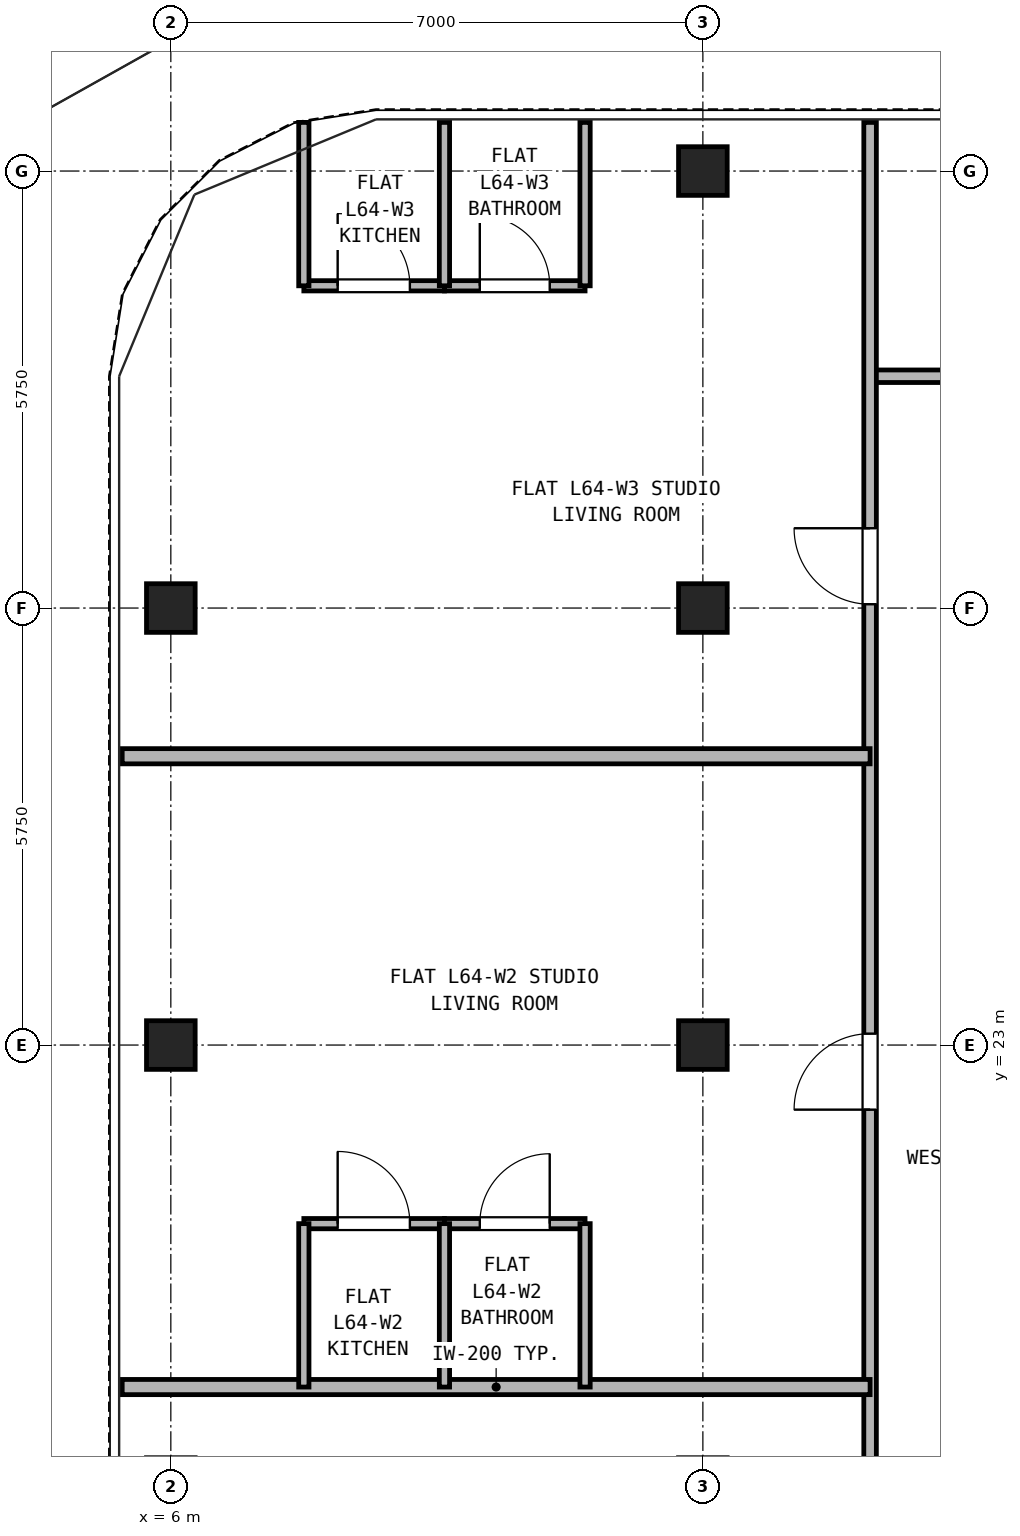
"""IFC4 building model, lengths in metres.
Left out: names, types, materials, properties, quantities, classifications, styles, units other than length and angle.
Written with IfcOpenShell. Run it as: python <this file> out.ifc"""

import sys

from ifc_helpers import new_model, si_unit, direction, frame, frame_2d, origin, origin_2d, place, context, subcontext, project, spatial, rectangle, hollow_rectangle, extrude, source, transform, mapped, element, fill, save


model = new_model("IFC4")
c1 = context("Model", 3, precision=1e-05, world=origin(), true_north=direction((0.0, 1.0)))
c2 = subcontext(c1, "Body", "Model", "MODEL_VIEW")
j1 = project(units=[si_unit("LENGTHUNIT", "METRE"), si_unit("PLANEANGLEUNIT", "RADIAN")], contexts=[c1])
p1 = place(None, origin())
s1 = spatial("IfcSite", under=j1, at=p1, CompositionType="ELEMENT")
p2 = place(p1, origin())
s2 = spatial("IfcBuilding", under=s1, at=p2, CompositionType="ELEMENT")
p3 = place(p2, frame((0.0, 0.0, 226.5)))
s3 = spatial("IfcBuildingStorey", under=s2, at=p3, CompositionType="ELEMENT", Elevation=226.5)
m1 = source(origin(), c2, "Body", "SweptSolid", [
    extrude(hollow_rectangle(XDim=0.64, YDim=0.64, WallThickness=0.035, at=origin_2d()), origin(), (0.0, 0.0, 1.0), 2.98),
])
for number, where, z_axis, x_axis in (
    (1, (13.0, 34.5, 0.0), (0.0, 0.0, 1.0), (1.0, 0.0, 0.0)),
    (2, (6.0, 23.0, 0.0), (0.0, 0.0, 1.0), (1.0, 0.0, 0.0)),
    (3, (6.0, 28.75, 0.0), (0.0, 0.0, 1.0), (1.0, 0.0, 0.0)),
    (4, (13.0, 23.0, 0.0), (0.0, 0.0, 1.0), (1.0, 0.0, 0.0)),
    (5, (13.0, 28.75, 0.0), (0.0, 0.0, 1.0), (1.0, 0.0, 0.0)),
):
    element("IfcColumn", number, at=place(p3, frame(where, z_axis=z_axis, x_axis=x_axis)), inside=s3, PredefinedType="COLUMN", context=c2, shape_type="MappedRepresentation", body=[
        mapped(m1, transform((0.0, 0.0, 0.0), x_axis=(1.0, 0.0, 0.0), y_axis=(0.0, 1.0, 0.0), z_axis=(0.0, 0.0, 1.0), scale=1.0)),
    ])
p4 = place(p3, frame((15.2, 31.8, 0.0), z_axis=(0.0, 0.0, 1.0), x_axis=(1.0, 0.0, 0.0)))
e6 = element("IfcWall", 6, at=p4, inside=s3, PredefinedType="PARTITIONING", context=c2, shape_type="SweptSolid", body=[
    extrude(rectangle(XDim=16.6, YDim=0.165, at=frame_2d((8.3, 0.0))), origin(), (0.0, 0.0, 1.0), 2.655),
])
p5 = place(p4, frame((3.65, 0.0, 0.0)))
e7 = element("IfcOpeningElement", 7, at=p5, cuts=e6, PredefinedType="OPENING", context=c2, shape_type="SweptSolid", body=[
    extrude(rectangle(XDim=0.95, YDim=2.15, at=frame_2d((0.475, 1.075))), frame((0.0, 0.093, 0.0), z_axis=(0.0, -1.0, 0.0), x_axis=(1.0, 0.0, 0.0)), (0.0, 0.0, 1.0), 0.185),
])
p6 = place(p4, frame((9.1, 0.0, 0.0)))
e8 = element("IfcOpeningElement", 8, at=p6, cuts=e6, PredefinedType="OPENING", context=c2, shape_type="SweptSolid", body=[
    extrude(rectangle(XDim=0.95, YDim=2.15, at=frame_2d((0.475, 1.075))), frame((0.0, 0.093, 0.0), z_axis=(0.0, -1.0, 0.0), x_axis=(1.0, 0.0, 0.0)), (0.0, 0.0, 1.0), 0.185),
])
p7 = place(p4, frame((13.25, 0.0, 0.0)))
e9 = element("IfcOpeningElement", 9, at=p7, cuts=e6, PredefinedType="OPENING", context=c2, shape_type="SweptSolid", body=[
    extrude(rectangle(XDim=0.92, YDim=2.1, at=frame_2d((0.46, 1.05))), frame((0.0, 0.093, 0.0), z_axis=(0.0, -1.0, 0.0), x_axis=(1.0, 0.0, 0.0)), (0.0, 0.0, 1.0), 0.185),
])
p8 = place(p3, frame((15.2, 10.65, 0.0), z_axis=(0.0, 0.0, 1.0), x_axis=(0.0, 1.0, 0.0)))
e10 = element("IfcWall", 10, at=p8, inside=s3, PredefinedType="PARTITIONING", context=c2, shape_type="SweptSolid", body=[
    extrude(rectangle(XDim=24.49, YDim=0.165, at=frame_2d((12.245, 0.0))), origin(), (0.0, 0.0, 1.0), 2.98),
])
p9 = place(p8, frame((3.425, 0.0, 0.0)))
e11 = element("IfcOpeningElement", 11, at=p9, cuts=e10, PredefinedType="OPENING", context=c2, shape_type="SweptSolid", body=[
    extrude(rectangle(XDim=1.0, YDim=2.15, at=frame_2d((0.5, 1.075))), frame((0.0, 0.093, 0.0), z_axis=(0.0, -1.0, 0.0), x_axis=(1.0, 0.0, 0.0)), (0.0, 0.0, 1.0), 0.185),
])
p10 = place(p8, frame((11.5, 0.0, 0.0)))
e12 = element("IfcOpeningElement", 12, at=p10, cuts=e10, PredefinedType="OPENING", context=c2, shape_type="SweptSolid", body=[
    extrude(rectangle(XDim=1.0, YDim=2.15, at=frame_2d((0.5, 1.075))), frame((0.0, 0.093, 0.0), z_axis=(0.0, -1.0, 0.0), x_axis=(1.0, 0.0, 0.0)), (0.0, 0.0, 1.0), 0.185),
])
p11 = place(p8, frame((18.15, 0.0, 0.0)))
e13 = element("IfcOpeningElement", 13, at=p11, cuts=e10, PredefinedType="OPENING", context=c2, shape_type="SweptSolid", body=[
    extrude(rectangle(XDim=1.0, YDim=2.15, at=frame_2d((0.5, 1.075))), frame((0.0, 0.093, 0.0), z_axis=(0.0, -1.0, 0.0), x_axis=(1.0, 0.0, 0.0)), (0.0, 0.0, 1.0), 0.185),
])
p12 = place(p3, frame((5.36, 18.5, 0.0), z_axis=(0.0, 0.0, 1.0), x_axis=(1.0, 0.0, 0.0)))
e14 = element("IfcWall", 14, at=p12, inside=s3, PredefinedType="PARTITIONING", context=c2, shape_type="SweptSolid", body=[
    extrude(rectangle(XDim=9.84, YDim=0.2, at=frame_2d((4.92, 0.0))), origin(), (0.0, 0.0, 1.0), 2.98),
])
p13 = place(p3, frame((7.75, 20.65, 0.0), z_axis=(0.0, 0.0, 1.0), x_axis=(1.0, 0.0, 0.0)))
e15 = element("IfcWall", 15, at=p13, inside=s3, PredefinedType="PARTITIONING", context=c2, shape_type="SweptSolid", body=[
    extrude(rectangle(XDim=1.85, YDim=0.135, at=frame_2d((0.925, 0.0))), origin(), (0.0, 0.0, 1.0), 2.98),
])
p14 = place(p13, frame((0.445, 0.0, 0.0)))
e16 = element("IfcOpeningElement", 16, at=p14, cuts=e15, PredefinedType="OPENING", context=c2, shape_type="SweptSolid", body=[
    extrude(rectangle(XDim=0.95, YDim=2.15, at=frame_2d((0.475, 1.075))), frame((0.0, 0.077, 0.0), z_axis=(0.0, -1.0, 0.0), x_axis=(1.0, 0.0, 0.0)), (0.0, 0.0, 1.0), 0.155),
])
p15 = place(p3, frame((9.6, 20.65, 0.0), z_axis=(0.0, 0.0, 1.0), x_axis=(1.0, 0.0, 0.0)))
e17 = element("IfcWall", 17, at=p15, inside=s3, PredefinedType="PARTITIONING", context=c2, shape_type="SweptSolid", body=[
    extrude(rectangle(XDim=1.85, YDim=0.135, at=frame_2d((0.925, 0.0))), origin(), (0.0, 0.0, 1.0), 2.98),
])
p16 = place(p15, frame((0.465, 0.0, 0.0)))
e18 = element("IfcOpeningElement", 18, at=p16, cuts=e17, PredefinedType="OPENING", context=c2, shape_type="SweptSolid", body=[
    extrude(rectangle(XDim=0.92, YDim=2.1, at=frame_2d((0.46, 1.05))), frame((0.0, 0.077, 0.0), z_axis=(0.0, -1.0, 0.0), x_axis=(1.0, 0.0, 0.0)), (0.0, 0.0, 1.0), 0.155),
])
for number, where, z_axis, x_axis in (
    (19, (7.75, 18.5, 0.0), (0.0, 0.0, 1.0), (0.0, 1.0, 0.0)),
    (20, (9.6, 18.5, 0.0), (0.0, 0.0, 1.0), (0.0, 1.0, 0.0)),
    (21, (11.45, 18.5, 0.0), (0.0, 0.0, 1.0), (0.0, 1.0, 0.0)),
):
    element("IfcWall", number, at=place(p3, frame(where, z_axis=z_axis, x_axis=x_axis)), inside=s3, PredefinedType="PARTITIONING", context=c2, shape_type="SweptSolid", body=[
        extrude(rectangle(XDim=2.15, YDim=0.135, at=frame_2d((1.075, 0.0))), origin(), (0.0, 0.0, 1.0), 2.98),
    ])
p17 = place(p3, frame((5.36, 26.8, 0.0), z_axis=(0.0, 0.0, 1.0), x_axis=(1.0, 0.0, 0.0)))
e22 = element("IfcWall", 22, at=p17, inside=s3, PredefinedType="PARTITIONING", context=c2, shape_type="SweptSolid", body=[
    extrude(rectangle(XDim=9.84, YDim=0.2, at=frame_2d((4.92, 0.0))), origin(), (0.0, 0.0, 1.0), 2.98),
])
p18 = place(p3, frame((7.75, 32.99, 0.0), z_axis=(0.0, 0.0, 1.0), x_axis=(1.0, 0.0, 0.0)))
e23 = element("IfcWall", 23, at=p18, inside=s3, PredefinedType="PARTITIONING", context=c2, shape_type="SweptSolid", body=[
    extrude(rectangle(XDim=1.85, YDim=0.135, at=frame_2d((0.925, 0.0))), origin(), (0.0, 0.0, 1.0), 2.98),
])
p19 = place(p18, frame((0.445, 0.0, 0.0)))
e24 = element("IfcOpeningElement", 24, at=p19, cuts=e23, PredefinedType="OPENING", context=c2, shape_type="SweptSolid", body=[
    extrude(rectangle(XDim=0.95, YDim=2.15, at=frame_2d((0.475, 1.075))), frame((0.0, 0.077, 0.0), z_axis=(0.0, -1.0, 0.0), x_axis=(1.0, 0.0, 0.0)), (0.0, 0.0, 1.0), 0.155),
])
p20 = place(p3, frame((9.6, 32.99, 0.0), z_axis=(0.0, 0.0, 1.0), x_axis=(1.0, 0.0, 0.0)))
e25 = element("IfcWall", 25, at=p20, inside=s3, PredefinedType="PARTITIONING", context=c2, shape_type="SweptSolid", body=[
    extrude(rectangle(XDim=1.85, YDim=0.135, at=frame_2d((0.925, 0.0))), origin(), (0.0, 0.0, 1.0), 2.98),
])
p21 = place(p20, frame((0.465, 0.0, 0.0)))
e26 = element("IfcOpeningElement", 26, at=p21, cuts=e25, PredefinedType="OPENING", context=c2, shape_type="SweptSolid", body=[
    extrude(rectangle(XDim=0.92, YDim=2.1, at=frame_2d((0.46, 1.05))), frame((0.0, 0.077, 0.0), z_axis=(0.0, -1.0, 0.0), x_axis=(1.0, 0.0, 0.0)), (0.0, 0.0, 1.0), 0.155),
])
for number, where, z_axis, x_axis in (
    (27, (7.75, 32.99, 0.0), (0.0, 0.0, 1.0), (0.0, 1.0, 0.0)),
    (28, (9.6, 32.99, 0.0), (0.0, 0.0, 1.0), (0.0, 1.0, 0.0)),
    (29, (11.45, 32.99, 0.0), (0.0, 0.0, 1.0), (0.0, 1.0, 0.0)),
):
    element("IfcWall", number, at=place(p3, frame(where, z_axis=z_axis, x_axis=x_axis)), inside=s3, PredefinedType="PARTITIONING", context=c2, shape_type="SweptSolid", body=[
        extrude(rectangle(XDim=2.15, YDim=0.135, at=frame_2d((1.075, 0.0))), origin(), (0.0, 0.0, 1.0), 2.98),
    ])
p22 = place(p14, origin())
e30 = element("IfcDoor", 30, at=p22, inside=s3, OperationType="SINGLE_SWING_LEFT", PredefinedType="DOOR", context=c2, shape_type="SweptSolid", body=[
    extrude(rectangle(XDim=0.95, YDim=2.15, at=frame_2d((0.475, 1.075))), frame((0.0, 0.025, 0.0), z_axis=(0.0, -1.0, 0.0), x_axis=(1.0, 0.0, 0.0)), (0.0, 0.0, 1.0), 0.05),
])
fill(e16, e30)
p23 = place(p16, origin())
e31 = element("IfcDoor", 31, at=p23, inside=s3, OperationType="SINGLE_SWING_RIGHT", PredefinedType="DOOR", context=c2, shape_type="SweptSolid", body=[
    extrude(rectangle(XDim=0.92, YDim=2.1, at=frame_2d((0.46, 1.05))), frame((0.0, 0.025, 0.0), z_axis=(0.0, -1.0, 0.0), x_axis=(1.0, 0.0, 0.0)), (0.0, 0.0, 1.0), 0.05),
])
fill(e18, e31)
p24 = place(p10, origin())
e32 = element("IfcDoor", 32, at=p24, inside=s3, OperationType="SINGLE_SWING_LEFT", PredefinedType="DOOR", context=c2, shape_type="SweptSolid", body=[
    extrude(rectangle(XDim=1.0, YDim=2.15, at=frame_2d((0.5, 1.075))), frame((0.0, 0.025, 0.0), z_axis=(0.0, -1.0, 0.0), x_axis=(1.0, 0.0, 0.0)), (0.0, 0.0, 1.0), 0.05),
])
fill(e12, e32)
p25 = place(p19, frame((0.95, 0.0, 0.0), z_axis=(0.0, 0.0, 1.0), x_axis=(-1.0, 0.0, 0.0)))
e33 = element("IfcDoor", 33, at=p25, inside=s3, OperationType="SINGLE_SWING_LEFT", PredefinedType="DOOR", context=c2, shape_type="SweptSolid", body=[
    extrude(rectangle(XDim=0.95, YDim=2.15, at=frame_2d((0.475, 1.075))), frame((0.0, 0.025, 0.0), z_axis=(0.0, -1.0, 0.0), x_axis=(1.0, 0.0, 0.0)), (0.0, 0.0, 1.0), 0.05),
])
fill(e24, e33)
p26 = place(p21, frame((0.92, 0.0, 0.0), z_axis=(0.0, 0.0, 1.0), x_axis=(-1.0, 0.0, 0.0)))
e34 = element("IfcDoor", 34, at=p26, inside=s3, OperationType="SINGLE_SWING_LEFT", PredefinedType="DOOR", context=c2, shape_type="SweptSolid", body=[
    extrude(rectangle(XDim=0.92, YDim=2.1, at=frame_2d((0.46, 1.05))), frame((0.0, 0.025, 0.0), z_axis=(0.0, -1.0, 0.0), x_axis=(1.0, 0.0, 0.0)), (0.0, 0.0, 1.0), 0.05),
])
fill(e26, e34)
p27 = place(p11, origin())
e35 = element("IfcDoor", 35, at=p27, inside=s3, OperationType="SINGLE_SWING_RIGHT", PredefinedType="DOOR", context=c2, shape_type="SweptSolid", body=[
    extrude(rectangle(XDim=1.0, YDim=2.15, at=frame_2d((0.5, 1.075))), frame((0.0, 0.025, 0.0), z_axis=(0.0, -1.0, 0.0), x_axis=(1.0, 0.0, 0.0)), (0.0, 0.0, 1.0), 0.05),
])
fill(e13, e35)
save(model, sys.argv[1])
